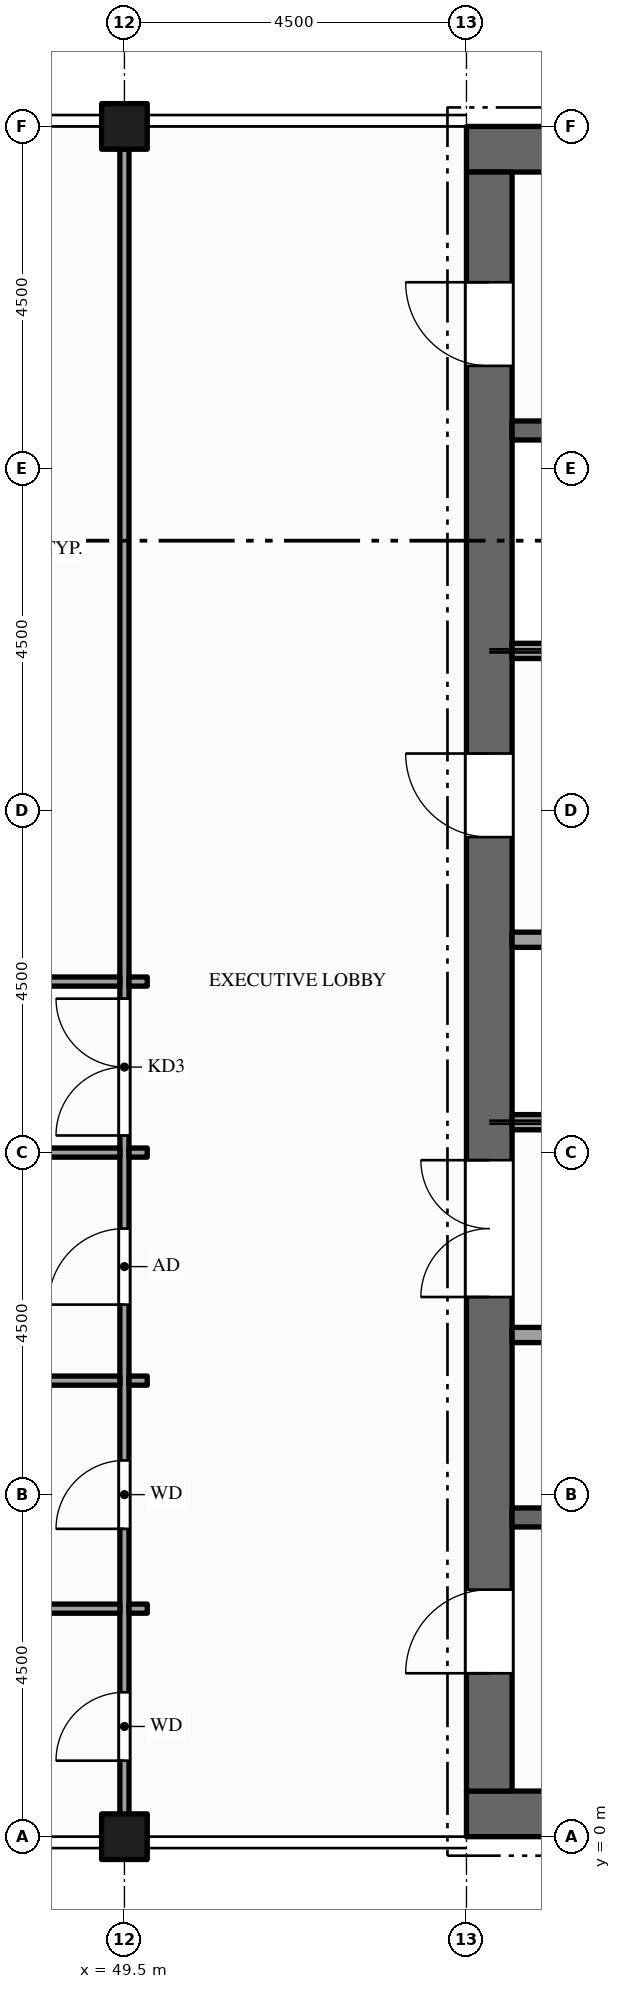
"""IFC4 building model, lengths in metres.
Left out: names, types, materials, properties, quantities, classifications, styles, units other than length and angle.
Written with IfcOpenShell. Run it as: python <this file> out.ifc"""

import sys

from ifc_helpers import new_model, si_unit, direction, frame, frame_2d, origin, origin_2d, place, context, subcontext, project, spatial, rectangle, hollow_rectangle, extrude, element, fill, save


model = new_model("IFC4")
c1 = context("Model", 3, precision=1e-05, world=origin(), true_north=direction((0.0, 1.0)))
c2 = subcontext(c1, "Body", "Model", "MODEL_VIEW")
j1 = project(units=[si_unit("LENGTHUNIT", "METRE"), si_unit("PLANEANGLEUNIT", "RADIAN")], contexts=[c1])
p1 = place(None, origin())
s1 = spatial("IfcSite", under=j1, at=p1, CompositionType="ELEMENT")
p2 = place(p1, origin())
s2 = spatial("IfcBuilding", under=s1, at=p2, CompositionType="ELEMENT")
p3 = place(p2, frame((0.0, 0.0, 332.0)))
s3 = spatial("IfcBuildingStorey", under=s2, at=p3, CompositionType="ELEMENT", Elevation=332.0)
for number, where, z_axis, x_axis in (
    (1, (67.5, 0.3, -0.15), (0.0, 0.0, 1.0), (-1.0, 0.0, 0.0)),
    (2, (54.0, 22.2, -0.15), (0.0, 0.0, 1.0), (1.0, 0.0, 0.0)),
):
    element("IfcWall", number, at=place(p3, frame(where, z_axis=z_axis, x_axis=x_axis)), inside=s3, PredefinedType="SHEAR", context=c2, shape_type="SweptSolid", body=[
        extrude(rectangle(XDim=13.5, YDim=0.6, at=frame_2d((6.75, 0.0))), origin(), (0.0, 0.0, 1.0), 4.5),
    ])
p4 = place(p3, frame((54.3, 0.6, -0.15), z_axis=(0.0, 0.0, 1.0), x_axis=(0.0, 1.0, 0.0)))
e3 = element("IfcWall", 3, at=p4, inside=s3, PredefinedType="SHEAR", context=c2, shape_type="SweptSolid", body=[
    extrude(rectangle(XDim=21.3, YDim=0.6, at=frame_2d((10.65, 0.0))), origin(), (0.0, 0.0, 1.0), 4.5),
])
p5 = place(p4, frame((6.5, 0.0, 0.15)))
e4 = element("IfcOpeningElement", 4, at=p5, cuts=e3, PredefinedType="OPENING", context=c2, shape_type="SweptSolid", body=[
    extrude(rectangle(XDim=1.8, YDim=2.1, at=frame_2d((0.9, 1.05))), frame((0.0, 0.31, 0.0), z_axis=(0.0, -1.0, 0.0), x_axis=(1.0, 0.0, 0.0)), (0.0, 0.0, 1.0), 0.62),
])
p6 = place(p4, frame((12.55, 0.0, 0.15)))
e5 = element("IfcOpeningElement", 5, at=p6, cuts=e3, PredefinedType="OPENING", context=c2, shape_type="SweptSolid", body=[
    extrude(rectangle(XDim=1.1, YDim=2.1, at=frame_2d((0.55, 1.05))), frame((0.0, 0.31, 0.0), z_axis=(0.0, -1.0, 0.0), x_axis=(1.0, 0.0, 0.0)), (0.0, 0.0, 1.0), 0.62),
])
p7 = place(p4, frame((1.55, 0.0, 0.15)))
e6 = element("IfcOpeningElement", 6, at=p7, cuts=e3, PredefinedType="OPENING", context=c2, shape_type="SweptSolid", body=[
    extrude(rectangle(XDim=1.1, YDim=2.1, at=frame_2d((0.55, 1.05))), frame((0.0, 0.31, 0.0), z_axis=(0.0, -1.0, 0.0), x_axis=(1.0, 0.0, 0.0)), (0.0, 0.0, 1.0), 0.62),
])
p8 = place(p4, frame((18.75, 0.0, 0.15)))
e7 = element("IfcOpeningElement", 7, at=p8, cuts=e3, PredefinedType="OPENING", context=c2, shape_type="SweptSolid", body=[
    extrude(rectangle(XDim=1.1, YDim=2.1, at=frame_2d((0.55, 1.05))), frame((0.0, 0.31, 0.0), z_axis=(0.0, -1.0, 0.0), x_axis=(1.0, 0.0, 0.0)), (0.0, 0.0, 1.0), 0.62),
])
for number, where, z_axis, x_axis in (
    (8, (49.5, 0.0, -0.15), (0.0, 0.0, 1.0), (1.0, 0.0, 0.0)),
    (9, (49.5, 22.5, -0.15), (0.0, 0.0, 1.0), (1.0, 0.0, 0.0)),
):
    element("IfcColumn", number, at=place(p3, frame(where, z_axis=z_axis, x_axis=x_axis)), inside=s3, PredefinedType="COLUMN", context=c2, shape_type="SweptSolid", body=[
        extrude(hollow_rectangle(XDim=0.6, YDim=0.6, WallThickness=0.03, at=origin_2d()), origin(), (0.0, 0.0, 1.0), 4.5),
    ])
p9 = place(p3, frame((49.5, 0.01, 0.0), z_axis=(0.0, 0.0, 1.0), x_axis=(0.0, 1.0, 0.0)))
e10 = element("IfcWall", 10, at=p9, inside=s3, PredefinedType="PARTITIONING", context=c2, shape_type="SweptSolid", body=[
    extrude(rectangle(XDim=22.48, YDim=0.12, at=frame_2d((11.24, 0.0))), origin(), (0.0, 0.0, 1.0), 3.359),
])
p10 = place(p9, frame((9.215, 0.0, 0.0)))
e11 = element("IfcOpeningElement", 11, at=p10, cuts=e10, PredefinedType="OPENING", context=c2, shape_type="SweptSolid", body=[
    extrude(rectangle(XDim=1.8, YDim=2.1, at=frame_2d((0.9, 1.05))), frame((0.0, 0.07, 0.0), z_axis=(0.0, -1.0, 0.0), x_axis=(1.0, 0.0, 0.0)), (0.0, 0.0, 1.0), 0.14),
])
p11 = place(p9, frame((0.99, 0.0, 0.0)))
e12 = element("IfcOpeningElement", 12, at=p11, cuts=e10, PredefinedType="OPENING", context=c2, shape_type="SweptSolid", body=[
    extrude(rectangle(XDim=0.9, YDim=2.1, at=frame_2d((0.45, 1.05))), frame((0.0, 0.07, 0.0), z_axis=(0.0, -1.0, 0.0), x_axis=(1.0, 0.0, 0.0)), (0.0, 0.0, 1.0), 0.14),
])
p12 = place(p9, frame((4.04, 0.0, 0.0)))
e13 = element("IfcOpeningElement", 13, at=p12, cuts=e10, PredefinedType="OPENING", context=c2, shape_type="SweptSolid", body=[
    extrude(rectangle(XDim=0.9, YDim=2.1, at=frame_2d((0.45, 1.05))), frame((0.0, 0.07, 0.0), z_axis=(0.0, -1.0, 0.0), x_axis=(1.0, 0.0, 0.0)), (0.0, 0.0, 1.0), 0.14),
])
p13 = place(p9, frame((6.99, 0.0, 0.0)))
e14 = element("IfcOpeningElement", 14, at=p13, cuts=e10, PredefinedType="OPENING", context=c2, shape_type="SweptSolid", body=[
    extrude(rectangle(XDim=1.0, YDim=2.1, at=frame_2d((0.5, 1.05))), frame((0.0, 0.07, 0.0), z_axis=(0.0, -1.0, 0.0), x_axis=(1.0, 0.0, 0.0)), (0.0, 0.0, 1.0), 0.14),
])
p14 = place(p3, frame((45.06, 3.0, 0.0), z_axis=(0.0, 0.0, 1.0), x_axis=(1.0, 0.0, 0.0)))
e15 = element("IfcWall", 15, at=p14, inside=s3, PredefinedType="PARTITIONING", context=c2, shape_type="SweptSolid", body=[
    extrude(rectangle(XDim=4.38, YDim=0.12, at=frame_2d((2.19, 0.0))), origin(), (0.0, 0.0, 1.0), 3.359),
])
p15 = place(p3, frame((49.56, 3.0, 0.0), z_axis=(0.0, 0.0, 1.0), x_axis=(1.0, 0.0, 0.0)))
e16 = element("IfcWall", 16, at=p15, inside=s3, PredefinedType="PARTITIONING", context=c2, shape_type="SweptSolid", body=[
    extrude(rectangle(XDim=0.24, YDim=0.12, at=frame_2d((0.12, 0.0))), origin(), (0.0, 0.0, 1.0), 3.359),
])
p16 = place(p3, frame((54.6, 4.2, 0.0), z_axis=(0.0, 0.0, 1.0), x_axis=(1.0, 0.0, 0.0)))
e17 = element("IfcWall", 17, at=p16, inside=s3, PredefinedType="SHEAR", context=c2, shape_type="SweptSolid", body=[
    extrude(rectangle(XDim=6.675, YDim=0.25, at=frame_2d((3.337, 0.0))), origin(), (0.0, 0.0, 1.0), 4.35),
])
p17 = place(p3, frame((45.06, 6.0, 0.0), z_axis=(0.0, 0.0, 1.0), x_axis=(1.0, 0.0, 0.0)))
e18 = element("IfcWall", 18, at=p17, inside=s3, PredefinedType="PARTITIONING", context=c2, shape_type="SweptSolid", body=[
    extrude(rectangle(XDim=4.38, YDim=0.12, at=frame_2d((2.19, 0.0))), origin(), (0.0, 0.0, 1.0), 3.359),
])
p18 = place(p3, frame((49.56, 6.0, 0.0), z_axis=(0.0, 0.0, 1.0), x_axis=(1.0, 0.0, 0.0)))
e19 = element("IfcWall", 19, at=p18, inside=s3, PredefinedType="PARTITIONING", context=c2, shape_type="SweptSolid", body=[
    extrude(rectangle(XDim=0.24, YDim=0.12, at=frame_2d((0.12, 0.0))), origin(), (0.0, 0.0, 1.0), 3.359),
])
p19 = place(p3, frame((54.6, 6.6, 0.0), z_axis=(0.0, 0.0, 1.0), x_axis=(1.0, 0.0, 0.0)))
e20 = element("IfcWall", 20, at=p19, inside=s3, PredefinedType="PARTITIONING", context=c2, shape_type="SweptSolid", body=[
    extrude(rectangle(XDim=9.25, YDim=0.2, at=frame_2d((4.625, 0.0))), origin(), (0.0, 0.0, 1.0), 4.35),
])
p20 = place(p19, frame((4.175, 0.0, 0.0)))
e21 = element("IfcOpeningElement", 21, at=p20, cuts=e20, PredefinedType="OPENING", context=c2, shape_type="SweptSolid", body=[
    extrude(rectangle(XDim=0.9, YDim=2.1, at=frame_2d((0.45, 1.05))), frame((0.0, 0.11, 0.0), z_axis=(0.0, -1.0, 0.0), x_axis=(1.0, 0.0, 0.0)), (0.0, 0.0, 1.0), 0.22),
])
p21 = place(p3, frame((45.06, 9.0, 0.0), z_axis=(0.0, 0.0, 1.0), x_axis=(1.0, 0.0, 0.0)))
e22 = element("IfcWall", 22, at=p21, inside=s3, PredefinedType="PARTITIONING", context=c2, shape_type="SweptSolid", body=[
    extrude(rectangle(XDim=4.38, YDim=0.12, at=frame_2d((2.19, 0.0))), origin(), (0.0, 0.0, 1.0), 3.359),
])
p22 = place(p3, frame((49.56, 9.0, 0.0), z_axis=(0.0, 0.0, 1.0), x_axis=(1.0, 0.0, 0.0)))
e23 = element("IfcWall", 23, at=p22, inside=s3, PredefinedType="PARTITIONING", context=c2, shape_type="SweptSolid", body=[
    extrude(rectangle(XDim=0.24, YDim=0.12, at=frame_2d((0.12, 0.0))), origin(), (0.0, 0.0, 1.0), 3.359),
])
p23 = place(p3, frame((54.6, 9.4, 0.0), z_axis=(0.0, 0.0, 1.0), x_axis=(1.0, 0.0, 0.0)))
e24 = element("IfcWall", 24, at=p23, inside=s3, PredefinedType="SOLIDWALL", context=c2, shape_type="SweptSolid", body=[
    extrude(rectangle(XDim=2.7, YDim=0.2, at=frame_2d((1.35, 0.0))), origin(), (0.0, 0.0, 1.0), 4.35),
])
p24 = place(p23, frame((0.8, 0.0, 0.012)))
e25 = element("IfcOpeningElement", 25, at=p24, cuts=e24, PredefinedType="OPENING", context=c2, shape_type="SweptSolid", body=[
    extrude(rectangle(XDim=1.1, YDim=2.1, at=frame_2d((0.55, 1.05))), frame((0.0, 0.11, 0.0), z_axis=(0.0, -1.0, 0.0), x_axis=(1.0, 0.0, 0.0)), (0.0, 0.0, 1.0), 0.22),
])
p25 = place(p3, frame((40.56, 11.25, 0.0), z_axis=(0.0, 0.0, 1.0), x_axis=(1.0, 0.0, 0.0)))
e26 = element("IfcWall", 26, at=p25, inside=s3, PredefinedType="PARTITIONING", context=c2, shape_type="SweptSolid", body=[
    extrude(rectangle(XDim=8.88, YDim=0.12, at=frame_2d((4.44, 0.0))), origin(), (0.0, 0.0, 1.0), 3.359),
])
p26 = place(p25, frame((3.84, 0.0, 0.0)))
e27 = element("IfcOpeningElement", 27, at=p26, cuts=e26, PredefinedType="OPENING", context=c2, shape_type="SweptSolid", body=[
    extrude(rectangle(XDim=1.2, YDim=2.1, at=frame_2d((0.6, 1.05))), frame((0.0, 0.07, 0.0), z_axis=(0.0, -1.0, 0.0), x_axis=(1.0, 0.0, 0.0)), (0.0, 0.0, 1.0), 0.14),
])
p27 = place(p3, frame((49.56, 11.25, 0.0), z_axis=(0.0, 0.0, 1.0), x_axis=(1.0, 0.0, 0.0)))
e28 = element("IfcWall", 28, at=p27, inside=s3, PredefinedType="PARTITIONING", context=c2, shape_type="SweptSolid", body=[
    extrude(rectangle(XDim=0.24, YDim=0.12, at=frame_2d((0.12, 0.0))), origin(), (0.0, 0.0, 1.0), 3.359),
])
p28 = place(p3, frame((54.6, 11.8, 0.0), z_axis=(0.0, 0.0, 1.0), x_axis=(1.0, 0.0, 0.0)))
e29 = element("IfcWall", 29, at=p28, inside=s3, PredefinedType="SOLIDWALL", context=c2, shape_type="SweptSolid", body=[
    extrude(rectangle(XDim=2.7, YDim=0.2, at=frame_2d((1.35, 0.0))), origin(), (0.0, 0.0, 1.0), 4.35),
])
p29 = place(p3, frame((54.6, 15.6, 0.0), z_axis=(0.0, 0.0, 1.0), x_axis=(1.0, 0.0, 0.0)))
e30 = element("IfcWall", 30, at=p29, inside=s3, PredefinedType="SOLIDWALL", context=c2, shape_type="SweptSolid", body=[
    extrude(rectangle(XDim=2.7, YDim=0.2, at=frame_2d((1.35, 0.0))), origin(), (0.0, 0.0, 1.0), 4.35),
])
p30 = place(p29, frame((0.8, 0.0, 0.012)))
e31 = element("IfcOpeningElement", 31, at=p30, cuts=e30, PredefinedType="OPENING", context=c2, shape_type="SweptSolid", body=[
    extrude(rectangle(XDim=1.1, YDim=2.1, at=frame_2d((0.55, 1.05))), frame((0.0, 0.11, 0.0), z_axis=(0.0, -1.0, 0.0), x_axis=(1.0, 0.0, 0.0)), (0.0, 0.0, 1.0), 0.22),
])
p31 = place(p3, frame((54.6, 18.5, 0.0), z_axis=(0.0, 0.0, 1.0), x_axis=(1.0, 0.0, 0.0)))
e32 = element("IfcWall", 32, at=p31, inside=s3, PredefinedType="SHEAR", context=c2, shape_type="SweptSolid", body=[
    extrude(rectangle(XDim=6.675, YDim=0.25, at=frame_2d((3.337, 0.0))), origin(), (0.0, 0.0, 1.0), 4.35),
])
p32 = place(p5, origin())
e33 = element("IfcDoor", 33, at=p32, inside=s3, OperationType="DOUBLE_DOOR_SINGLE_SWING", PredefinedType="DOOR", context=c2, shape_type="SweptSolid", body=[
    extrude(rectangle(XDim=1.8, YDim=2.1, at=frame_2d((0.9, 1.05))), frame((0.0, 0.025, 0.0), z_axis=(0.0, -1.0, 0.0), x_axis=(1.0, 0.0, 0.0)), (0.0, 0.0, 1.0), 0.05),
])
fill(e4, e33)
p33 = place(p6, origin())
e34 = element("IfcDoor", 34, at=p33, inside=s3, OperationType="SINGLE_SWING_RIGHT", PredefinedType="DOOR", context=c2, shape_type="SweptSolid", body=[
    extrude(rectangle(XDim=1.1, YDim=2.1, at=frame_2d((0.55, 1.05))), frame((0.0, 0.025, 0.0), z_axis=(0.0, -1.0, 0.0), x_axis=(1.0, 0.0, 0.0)), (0.0, 0.0, 1.0), 0.05),
])
fill(e5, e34)
p34 = place(p7, origin())
e35 = element("IfcDoor", 35, at=p34, inside=s3, OperationType="SINGLE_SWING_LEFT", PredefinedType="DOOR", context=c2, shape_type="SweptSolid", body=[
    extrude(rectangle(XDim=1.1, YDim=2.1, at=frame_2d((0.55, 1.05))), frame((0.0, 0.025, 0.0), z_axis=(0.0, -1.0, 0.0), x_axis=(1.0, 0.0, 0.0)), (0.0, 0.0, 1.0), 0.05),
])
fill(e6, e35)
p35 = place(p8, origin())
e36 = element("IfcDoor", 36, at=p35, inside=s3, OperationType="SINGLE_SWING_RIGHT", PredefinedType="DOOR", context=c2, shape_type="SweptSolid", body=[
    extrude(rectangle(XDim=1.1, YDim=2.1, at=frame_2d((0.55, 1.05))), frame((0.0, 0.025, 0.0), z_axis=(0.0, -1.0, 0.0), x_axis=(1.0, 0.0, 0.0)), (0.0, 0.0, 1.0), 0.05),
])
fill(e7, e36)
p36 = place(p10, origin())
e37 = element("IfcDoor", 37, at=p36, inside=s3, OperationType="DOUBLE_DOOR_SINGLE_SWING", PredefinedType="DOOR", context=c2, shape_type="SweptSolid", body=[
    extrude(rectangle(XDim=1.8, YDim=2.1, at=frame_2d((0.9, 1.05))), frame((0.0, 0.025, 0.0), z_axis=(0.0, -1.0, 0.0), x_axis=(1.0, 0.0, 0.0)), (0.0, 0.0, 1.0), 0.05),
])
fill(e11, e37)
p37 = place(p11, origin())
e38 = element("IfcDoor", 38, at=p37, inside=s3, OperationType="SINGLE_SWING_LEFT", PredefinedType="DOOR", context=c2, shape_type="SweptSolid", body=[
    extrude(rectangle(XDim=0.9, YDim=2.1, at=frame_2d((0.45, 1.05))), frame((0.0, 0.025, 0.0), z_axis=(0.0, -1.0, 0.0), x_axis=(1.0, 0.0, 0.0)), (0.0, 0.0, 1.0), 0.05),
])
fill(e12, e38)
p38 = place(p12, origin())
e39 = element("IfcDoor", 39, at=p38, inside=s3, OperationType="SINGLE_SWING_LEFT", PredefinedType="DOOR", context=c2, shape_type="SweptSolid", body=[
    extrude(rectangle(XDim=0.9, YDim=2.1, at=frame_2d((0.45, 1.05))), frame((0.0, 0.025, 0.0), z_axis=(0.0, -1.0, 0.0), x_axis=(1.0, 0.0, 0.0)), (0.0, 0.0, 1.0), 0.05),
])
fill(e13, e39)
p39 = place(p13, origin())
e40 = element("IfcDoor", 40, at=p39, inside=s3, OperationType="SINGLE_SWING_LEFT", PredefinedType="DOOR", context=c2, shape_type="SweptSolid", body=[
    extrude(rectangle(XDim=1.0, YDim=2.1, at=frame_2d((0.5, 1.05))), frame((0.0, 0.025, 0.0), z_axis=(0.0, -1.0, 0.0), x_axis=(1.0, 0.0, 0.0)), (0.0, 0.0, 1.0), 0.05),
])
fill(e14, e40)
save(model, sys.argv[1])
